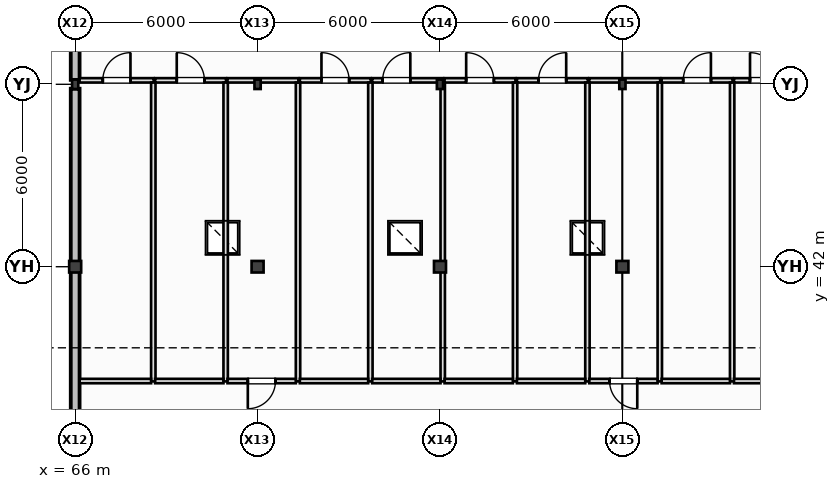
"""IFC4 building model, lengths in metres.
Left out: names, types, materials, properties, quantities, classifications, styles, units other than length and angle.
Written with IfcOpenShell. Run it as: python <this file> out.ifc"""

import sys

from ifc_helpers import new_model, si_unit, direction, frame, frame_2d, origin, origin_2d, place, context, subcontext, project, spatial, rectangle, i_section, extrude, element, fill, save


model = new_model("IFC4")
c1 = context("Model", 3, precision=1e-05, world=origin(), true_north=direction((0.0, 1.0)))
c2 = subcontext(c1, "Body", "Model", "MODEL_VIEW")
j1 = project(units=[si_unit("LENGTHUNIT", "METRE"), si_unit("PLANEANGLEUNIT", "RADIAN")], contexts=[c1])
p1 = place(None, origin())
s1 = spatial("IfcSite", under=j1, at=p1, CompositionType="ELEMENT")
p2 = place(p1, origin())
s2 = spatial("IfcBuilding", under=s1, at=p2, CompositionType="ELEMENT")
p3 = place(p2, frame((0.0, 0.0, 10.0)))
s3 = spatial("IfcBuildingStorey", under=s2, at=p3, CompositionType="ELEMENT", Elevation=10.0)
p4 = place(p3, frame((66.0, 42.0, 0.0), z_axis=(0.0, 0.0, 1.0), x_axis=(1.0, 0.0, 0.0)))
e1 = element("IfcColumn", 1, at=p4, inside=s3, PredefinedType="COLUMN", context=c2, shape_type="SweptSolid", body=[
    extrude(i_section(OverallWidth=0.395, OverallDepth=0.38, WebThickness=0.019, FlangeThickness=0.03, at=origin_2d()), origin(), (0.0, 0.0, 1.0), 4.0),
])
p5 = place(p3, frame((66.0, 48.0, 0.0), z_axis=(0.0, 0.0, 1.0), x_axis=(1.0, 0.0, 0.0)))
e2 = element("IfcColumn", 2, at=p5, inside=s3, PredefinedType="COLUMN", context=c2, shape_type="SweptSolid", body=[
    extrude(i_section(OverallWidth=0.205, OverallDepth=0.31, WebThickness=0.01, FlangeThickness=0.016, at=origin_2d()), origin(), (0.0, 0.0, 1.0), 4.0),
])
p6 = place(p3, frame((72.0, 42.0, 0.0), z_axis=(0.0, 0.0, 1.0), x_axis=(1.0, 0.0, 0.0)))
e3 = element("IfcColumn", 3, at=p6, inside=s3, PredefinedType="COLUMN", context=c2, shape_type="SweptSolid", body=[
    extrude(i_section(OverallWidth=0.395, OverallDepth=0.38, WebThickness=0.019, FlangeThickness=0.03, at=origin_2d()), origin(), (0.0, 0.0, 1.0), 4.0),
])
p7 = place(p3, frame((72.0, 48.0, 0.0), z_axis=(0.0, 0.0, 1.0), x_axis=(1.0, 0.0, 0.0)))
e4 = element("IfcColumn", 4, at=p7, inside=s3, PredefinedType="COLUMN", context=c2, shape_type="SweptSolid", body=[
    extrude(i_section(OverallWidth=0.205, OverallDepth=0.31, WebThickness=0.01, FlangeThickness=0.016, at=origin_2d()), origin(), (0.0, 0.0, 1.0), 4.0),
])
p8 = place(p3, frame((78.0, 42.0, 0.0), z_axis=(0.0, 0.0, 1.0), x_axis=(1.0, 0.0, 0.0)))
e5 = element("IfcColumn", 5, at=p8, inside=s3, PredefinedType="COLUMN", context=c2, shape_type="SweptSolid", body=[
    extrude(i_section(OverallWidth=0.395, OverallDepth=0.38, WebThickness=0.019, FlangeThickness=0.03, at=origin_2d()), origin(), (0.0, 0.0, 1.0), 4.0),
])
p9 = place(p3, frame((78.0, 48.0, 0.0), z_axis=(0.0, 0.0, 1.0), x_axis=(1.0, 0.0, 0.0)))
e6 = element("IfcColumn", 6, at=p9, inside=s3, PredefinedType="COLUMN", context=c2, shape_type="SweptSolid", body=[
    extrude(i_section(OverallWidth=0.205, OverallDepth=0.31, WebThickness=0.01, FlangeThickness=0.016, at=origin_2d()), origin(), (0.0, 0.0, 1.0), 4.0),
])
p10 = place(p3, frame((84.0, 42.0, 0.0), z_axis=(0.0, 0.0, 1.0), x_axis=(1.0, 0.0, 0.0)))
e7 = element("IfcColumn", 7, at=p10, inside=s3, PredefinedType="COLUMN", context=c2, shape_type="SweptSolid", body=[
    extrude(i_section(OverallWidth=0.395, OverallDepth=0.38, WebThickness=0.019, FlangeThickness=0.03, at=origin_2d()), origin(), (0.0, 0.0, 1.0), 4.0),
])
p11 = place(p3, frame((84.0, 48.0, 0.0), z_axis=(0.0, 0.0, 1.0), x_axis=(1.0, 0.0, 0.0)))
e8 = element("IfcColumn", 8, at=p11, inside=s3, PredefinedType="COLUMN", context=c2, shape_type="SweptSolid", body=[
    extrude(i_section(OverallWidth=0.205, OverallDepth=0.31, WebThickness=0.01, FlangeThickness=0.016, at=origin_2d()), origin(), (0.0, 0.0, 1.0), 4.0),
])
p12 = place(p3, frame((66.0, 41.855, 0.0), z_axis=(0.0, 0.0, 1.0), x_axis=(0.0, -1.0, 0.0)))
e9 = element("IfcWall", 9, at=p12, inside=s3, PredefinedType="STANDARD", context=c2, shape_type="SweptSolid", body=[
    extrude(rectangle(XDim=5.71, YDim=0.29, at=frame_2d((2.855, 0.0))), origin(), (0.0, 0.0, 1.0), 1.37),
])
for number, where, z_axis, x_axis in (
    (10, (66.0, 47.855, 0.0), (0.0, 0.0, 1.0), (0.0, -1.0, 0.0)),
    (11, (66.0, 53.855, 0.0), (0.0, 0.0, 1.0), (0.0, -1.0, 0.0)),
):
    element("IfcWall", number, at=place(p3, frame(where, z_axis=z_axis, x_axis=x_axis)), inside=s3, PredefinedType="STANDARD", context=c2, shape_type="SweptSolid", body=[
        extrude(rectangle(XDim=5.71, YDim=0.29, at=frame_2d((2.855, 0.0))), origin(), (0.0, 0.0, 1.0), 1.391),
    ])
p13 = place(p3, frame((66.145, 48.13, 0.0), z_axis=(0.0, 0.0, 1.0), x_axis=(1.0, 0.0, 0.0)))
e12 = element("IfcWall", 12, at=p13, inside=s3, PredefinedType="PARTITIONING", context=c2, shape_type="SweptSolid", body=[
    extrude(rectangle(XDim=2.438, YDim=0.145, at=frame_2d((1.219, 0.0))), origin(), (0.0, 0.0, 1.0), 3.74),
])
p14 = place(p13, frame((0.764, 0.0, 0.0)))
e13 = element("IfcOpeningElement", 13, at=p14, cuts=e12, PredefinedType="OPENING", context=c2, shape_type="SweptSolid", body=[
    extrude(rectangle(XDim=0.91, YDim=2.1, at=frame_2d((0.455, 1.05))), frame((0.0, 0.083, 0.0), z_axis=(0.0, -1.0, 0.0), x_axis=(1.0, 0.0, 0.0)), (0.0, 0.0, 1.0), 0.165),
])
p15 = place(p3, frame((68.57, 48.058, 0.0), z_axis=(0.0, 0.0, 1.0), x_axis=(0.0, -1.0, 0.0)))
e14 = element("IfcWall", 14, at=p15, inside=s3, PredefinedType="PARTITIONING", context=c2, shape_type="SweptSolid", body=[
    extrude(rectangle(XDim=9.83, YDim=0.145, at=frame_2d((4.915, 0.0))), origin(), (0.0, 0.0, 1.0), 3.74),
])
p16 = place(p3, frame((68.498, 38.24, 0.0), z_axis=(0.0, 0.0, 1.0), x_axis=(-1.0, 0.0, 0.0)))
e15 = element("IfcWall", 15, at=p16, inside=s3, PredefinedType="PARTITIONING", context=c2, shape_type="SweptSolid", body=[
    extrude(rectangle(XDim=2.353, YDim=0.145, at=frame_2d((1.176, 0.0))), origin(), (0.0, 0.0, 1.0), 3.74),
])
p17 = place(p3, frame((68.63, 48.13, 0.0), z_axis=(0.0, 0.0, 1.0), x_axis=(1.0, 0.0, 0.0)))
e16 = element("IfcWall", 16, at=p17, inside=s3, PredefinedType="PARTITIONING", context=c2, shape_type="SweptSolid", body=[
    extrude(rectangle(XDim=2.333, YDim=0.145, at=frame_2d((1.166, 0.0))), origin(), (0.0, 0.0, 1.0), 3.74),
])
p18 = place(p17, frame((0.711, 0.0, 0.0)))
e17 = element("IfcOpeningElement", 17, at=p18, cuts=e16, PredefinedType="OPENING", context=c2, shape_type="SweptSolid", body=[
    extrude(rectangle(XDim=0.91, YDim=2.1, at=frame_2d((0.455, 1.05))), frame((0.0, 0.083, 0.0), z_axis=(0.0, -1.0, 0.0), x_axis=(1.0, 0.0, 0.0)), (0.0, 0.0, 1.0), 0.165),
])
p19 = place(p3, frame((70.95, 48.058, 0.0), z_axis=(0.0, 0.0, 1.0), x_axis=(0.0, -1.0, 0.0)))
e18 = element("IfcWall", 18, at=p19, inside=s3, PredefinedType="PARTITIONING", context=c2, shape_type="SweptSolid", body=[
    extrude(rectangle(XDim=9.83, YDim=0.145, at=frame_2d((4.915, 0.0))), origin(), (0.0, 0.0, 1.0), 3.74),
])
p20 = place(p3, frame((70.877, 38.24, 0.0), z_axis=(0.0, 0.0, 1.0), x_axis=(-1.0, 0.0, 0.0)))
e19 = element("IfcWall", 19, at=p20, inside=s3, PredefinedType="PARTITIONING", context=c2, shape_type="SweptSolid", body=[
    extrude(rectangle(XDim=2.248, YDim=0.145, at=frame_2d((1.124, 0.0))), origin(), (0.0, 0.0, 1.0), 3.74),
])
p21 = place(p3, frame((71.01, 48.13, 0.0), z_axis=(0.0, 0.0, 1.0), x_axis=(1.0, 0.0, 0.0)))
e20 = element("IfcWall", 20, at=p21, inside=s3, PredefinedType="PARTITIONING", context=c2, shape_type="SweptSolid", body=[
    extrude(rectangle(XDim=2.333, YDim=0.145, at=frame_2d((1.166, 0.0))), origin(), (0.0, 0.0, 1.0), 3.74),
])
p22 = place(p3, frame((73.33, 48.058, 0.0), z_axis=(0.0, 0.0, 1.0), x_axis=(0.0, -1.0, 0.0)))
e21 = element("IfcWall", 21, at=p22, inside=s3, PredefinedType="PARTITIONING", context=c2, shape_type="SweptSolid", body=[
    extrude(rectangle(XDim=9.83, YDim=0.145, at=frame_2d((4.915, 0.0))), origin(), (0.0, 0.0, 1.0), 3.74),
])
p23 = place(p3, frame((73.258, 38.24, 0.0), z_axis=(0.0, 0.0, 1.0), x_axis=(-1.0, 0.0, 0.0)))
e22 = element("IfcWall", 22, at=p23, inside=s3, PredefinedType="PARTITIONING", context=c2, shape_type="SweptSolid", body=[
    extrude(rectangle(XDim=2.248, YDim=0.145, at=frame_2d((1.124, 0.0))), origin(), (0.0, 0.0, 1.0), 3.74),
])
p24 = place(p23, frame((0.669, 0.0, 0.0)))
e23 = element("IfcOpeningElement", 23, at=p24, cuts=e22, PredefinedType="OPENING", context=c2, shape_type="SweptSolid", body=[
    extrude(rectangle(XDim=0.91, YDim=2.1, at=frame_2d((0.455, 1.05))), frame((0.0, 0.083, 0.0), z_axis=(0.0, -1.0, 0.0), x_axis=(1.0, 0.0, 0.0)), (0.0, 0.0, 1.0), 0.165),
])
p25 = place(p3, frame((73.39, 48.13, 0.0), z_axis=(0.0, 0.0, 1.0), x_axis=(1.0, 0.0, 0.0)))
e24 = element("IfcWall", 24, at=p25, inside=s3, PredefinedType="PARTITIONING", context=c2, shape_type="SweptSolid", body=[
    extrude(rectangle(XDim=2.333, YDim=0.145, at=frame_2d((1.166, 0.0))), origin(), (0.0, 0.0, 1.0), 3.74),
])
p26 = place(p25, frame((0.711, 0.0, 0.0)))
e25 = element("IfcOpeningElement", 25, at=p26, cuts=e24, PredefinedType="OPENING", context=c2, shape_type="SweptSolid", body=[
    extrude(rectangle(XDim=0.91, YDim=2.1, at=frame_2d((0.455, 1.05))), frame((0.0, 0.083, 0.0), z_axis=(0.0, -1.0, 0.0), x_axis=(1.0, 0.0, 0.0)), (0.0, 0.0, 1.0), 0.165),
])
p27 = place(p3, frame((75.71, 48.058, 0.0), z_axis=(0.0, 0.0, 1.0), x_axis=(0.0, -1.0, 0.0)))
e26 = element("IfcWall", 26, at=p27, inside=s3, PredefinedType="PARTITIONING", context=c2, shape_type="SweptSolid", body=[
    extrude(rectangle(XDim=9.83, YDim=0.145, at=frame_2d((4.915, 0.0))), origin(), (0.0, 0.0, 1.0), 3.74),
])
p28 = place(p3, frame((75.637, 38.24, 0.0), z_axis=(0.0, 0.0, 1.0), x_axis=(-1.0, 0.0, 0.0)))
e27 = element("IfcWall", 27, at=p28, inside=s3, PredefinedType="PARTITIONING", context=c2, shape_type="SweptSolid", body=[
    extrude(rectangle(XDim=2.248, YDim=0.145, at=frame_2d((1.124, 0.0))), origin(), (0.0, 0.0, 1.0), 3.74),
])
p29 = place(p3, frame((75.77, 48.13, 0.0), z_axis=(0.0, 0.0, 1.0), x_axis=(1.0, 0.0, 0.0)))
e28 = element("IfcWall", 28, at=p29, inside=s3, PredefinedType="PARTITIONING", context=c2, shape_type="SweptSolid", body=[
    extrude(rectangle(XDim=2.333, YDim=0.145, at=frame_2d((1.166, 0.0))), origin(), (0.0, 0.0, 1.0), 3.74),
])
p30 = place(p29, frame((0.344, 0.0, 0.0)))
e29 = element("IfcOpeningElement", 29, at=p30, cuts=e28, PredefinedType="OPENING", context=c2, shape_type="SweptSolid", body=[
    extrude(rectangle(XDim=0.91, YDim=2.1, at=frame_2d((0.455, 1.05))), frame((0.0, 0.083, 0.0), z_axis=(0.0, -1.0, 0.0), x_axis=(1.0, 0.0, 0.0)), (0.0, 0.0, 1.0), 0.165),
])
p31 = place(p3, frame((78.09, 48.058, 0.0), z_axis=(0.0, 0.0, 1.0), x_axis=(0.0, -1.0, 0.0)))
e30 = element("IfcWall", 30, at=p31, inside=s3, PredefinedType="PARTITIONING", context=c2, shape_type="SweptSolid", body=[
    extrude(rectangle(XDim=9.83, YDim=0.145, at=frame_2d((4.915, 0.0))), origin(), (0.0, 0.0, 1.0), 3.74),
])
p32 = place(p3, frame((78.018, 38.24, 0.0), z_axis=(0.0, 0.0, 1.0), x_axis=(-1.0, 0.0, 0.0)))
e31 = element("IfcWall", 31, at=p32, inside=s3, PredefinedType="PARTITIONING", context=c2, shape_type="SweptSolid", body=[
    extrude(rectangle(XDim=2.248, YDim=0.145, at=frame_2d((1.124, 0.0))), origin(), (0.0, 0.0, 1.0), 3.74),
])
p33 = place(p3, frame((78.15, 48.13, 0.0), z_axis=(0.0, 0.0, 1.0), x_axis=(1.0, 0.0, 0.0)))
e32 = element("IfcWall", 32, at=p33, inside=s3, PredefinedType="PARTITIONING", context=c2, shape_type="SweptSolid", body=[
    extrude(rectangle(XDim=2.333, YDim=0.145, at=frame_2d((1.166, 0.0))), origin(), (0.0, 0.0, 1.0), 3.74),
])
p34 = place(p33, frame((0.711, 0.0, 0.0)))
e33 = element("IfcOpeningElement", 33, at=p34, cuts=e32, PredefinedType="OPENING", context=c2, shape_type="SweptSolid", body=[
    extrude(rectangle(XDim=0.91, YDim=2.1, at=frame_2d((0.455, 1.05))), frame((0.0, 0.083, 0.0), z_axis=(0.0, -1.0, 0.0), x_axis=(1.0, 0.0, 0.0)), (0.0, 0.0, 1.0), 0.165),
])
p35 = place(p3, frame((80.47, 48.058, 0.0), z_axis=(0.0, 0.0, 1.0), x_axis=(0.0, -1.0, 0.0)))
e34 = element("IfcWall", 34, at=p35, inside=s3, PredefinedType="PARTITIONING", context=c2, shape_type="SweptSolid", body=[
    extrude(rectangle(XDim=9.83, YDim=0.145, at=frame_2d((4.915, 0.0))), origin(), (0.0, 0.0, 1.0), 3.74),
])
p36 = place(p3, frame((80.397, 38.24, 0.0), z_axis=(0.0, 0.0, 1.0), x_axis=(-1.0, 0.0, 0.0)))
e35 = element("IfcWall", 35, at=p36, inside=s3, PredefinedType="PARTITIONING", context=c2, shape_type="SweptSolid", body=[
    extrude(rectangle(XDim=2.248, YDim=0.145, at=frame_2d((1.124, 0.0))), origin(), (0.0, 0.0, 1.0), 3.74),
])
p37 = place(p3, frame((80.53, 48.13, 0.0), z_axis=(0.0, 0.0, 1.0), x_axis=(1.0, 0.0, 0.0)))
e36 = element("IfcWall", 36, at=p37, inside=s3, PredefinedType="PARTITIONING", context=c2, shape_type="SweptSolid", body=[
    extrude(rectangle(XDim=2.333, YDim=0.145, at=frame_2d((1.166, 0.0))), origin(), (0.0, 0.0, 1.0), 3.74),
])
p38 = place(p37, frame((0.711, 0.0, 0.0)))
e37 = element("IfcOpeningElement", 37, at=p38, cuts=e36, PredefinedType="OPENING", context=c2, shape_type="SweptSolid", body=[
    extrude(rectangle(XDim=0.91, YDim=2.1, at=frame_2d((0.455, 1.05))), frame((0.0, 0.083, 0.0), z_axis=(0.0, -1.0, 0.0), x_axis=(1.0, 0.0, 0.0)), (0.0, 0.0, 1.0), 0.165),
])
p39 = place(p3, frame((82.85, 48.058, 0.0), z_axis=(0.0, 0.0, 1.0), x_axis=(0.0, -1.0, 0.0)))
e38 = element("IfcWall", 38, at=p39, inside=s3, PredefinedType="PARTITIONING", context=c2, shape_type="SweptSolid", body=[
    extrude(rectangle(XDim=9.83, YDim=0.145, at=frame_2d((4.915, 0.0))), origin(), (0.0, 0.0, 1.0), 3.74),
])
p40 = place(p3, frame((82.778, 38.24, 0.0), z_axis=(0.0, 0.0, 1.0), x_axis=(-1.0, 0.0, 0.0)))
e39 = element("IfcWall", 39, at=p40, inside=s3, PredefinedType="PARTITIONING", context=c2, shape_type="SweptSolid", body=[
    extrude(rectangle(XDim=2.248, YDim=0.145, at=frame_2d((1.124, 0.0))), origin(), (0.0, 0.0, 1.0), 3.74),
])
p41 = place(p3, frame((82.91, 48.13, 0.0), z_axis=(0.0, 0.0, 1.0), x_axis=(1.0, 0.0, 0.0)))
e40 = element("IfcWall", 40, at=p41, inside=s3, PredefinedType="PARTITIONING", context=c2, shape_type="SweptSolid", body=[
    extrude(rectangle(XDim=2.333, YDim=0.145, at=frame_2d((1.166, 0.0))), origin(), (0.0, 0.0, 1.0), 3.74),
])
p42 = place(p3, frame((85.23, 48.058, 0.0), z_axis=(0.0, 0.0, 1.0), x_axis=(0.0, -1.0, 0.0)))
e41 = element("IfcWall", 41, at=p42, inside=s3, PredefinedType="PARTITIONING", context=c2, shape_type="SweptSolid", body=[
    extrude(rectangle(XDim=9.83, YDim=0.145, at=frame_2d((4.915, 0.0))), origin(), (0.0, 0.0, 1.0), 3.74),
])
p43 = place(p3, frame((85.157, 38.24, 0.0), z_axis=(0.0, 0.0, 1.0), x_axis=(-1.0, 0.0, 0.0)))
e42 = element("IfcWall", 42, at=p43, inside=s3, PredefinedType="PARTITIONING", context=c2, shape_type="SweptSolid", body=[
    extrude(rectangle(XDim=2.248, YDim=0.145, at=frame_2d((1.124, 0.0))), origin(), (0.0, 0.0, 1.0), 3.74),
])
p44 = place(p43, frame((0.669, 0.0, 0.0)))
e43 = element("IfcOpeningElement", 43, at=p44, cuts=e42, PredefinedType="OPENING", context=c2, shape_type="SweptSolid", body=[
    extrude(rectangle(XDim=0.91, YDim=2.1, at=frame_2d((0.455, 1.05))), frame((0.0, 0.083, 0.0), z_axis=(0.0, -1.0, 0.0), x_axis=(1.0, 0.0, 0.0)), (0.0, 0.0, 1.0), 0.165),
])
p45 = place(p3, frame((85.29, 48.13, 0.0), z_axis=(0.0, 0.0, 1.0), x_axis=(1.0, 0.0, 0.0)))
e44 = element("IfcWall", 44, at=p45, inside=s3, PredefinedType="PARTITIONING", context=c2, shape_type="SweptSolid", body=[
    extrude(rectangle(XDim=2.333, YDim=0.145, at=frame_2d((1.166, 0.0))), origin(), (0.0, 0.0, 1.0), 3.74),
])
p46 = place(p45, frame((0.711, 0.0, 0.0)))
e45 = element("IfcOpeningElement", 45, at=p46, cuts=e44, PredefinedType="OPENING", context=c2, shape_type="SweptSolid", body=[
    extrude(rectangle(XDim=0.91, YDim=2.1, at=frame_2d((0.455, 1.05))), frame((0.0, 0.083, 0.0), z_axis=(0.0, -1.0, 0.0), x_axis=(1.0, 0.0, 0.0)), (0.0, 0.0, 1.0), 0.165),
])
p47 = place(p3, frame((87.61, 48.058, 0.0), z_axis=(0.0, 0.0, 1.0), x_axis=(0.0, -1.0, 0.0)))
e46 = element("IfcWall", 46, at=p47, inside=s3, PredefinedType="PARTITIONING", context=c2, shape_type="SweptSolid", body=[
    extrude(rectangle(XDim=9.83, YDim=0.145, at=frame_2d((4.915, 0.0))), origin(), (0.0, 0.0, 1.0), 3.74),
])
p48 = place(p3, frame((87.538, 38.24, 0.0), z_axis=(0.0, 0.0, 1.0), x_axis=(-1.0, 0.0, 0.0)))
e47 = element("IfcWall", 47, at=p48, inside=s3, PredefinedType="PARTITIONING", context=c2, shape_type="SweptSolid", body=[
    extrude(rectangle(XDim=2.248, YDim=0.145, at=frame_2d((1.124, 0.0))), origin(), (0.0, 0.0, 1.0), 3.74),
])
p49 = place(p3, frame((87.67, 48.13, 0.0), z_axis=(0.0, 0.0, 1.0), x_axis=(1.0, 0.0, 0.0)))
e48 = element("IfcWall", 48, at=p49, inside=s3, PredefinedType="PARTITIONING", context=c2, shape_type="SweptSolid", body=[
    extrude(rectangle(XDim=2.333, YDim=0.145, at=frame_2d((1.166, 0.0))), origin(), (0.0, 0.0, 1.0), 3.74),
])
p50 = place(p49, frame((0.528, 0.0, 0.0)))
e49 = element("IfcOpeningElement", 49, at=p50, cuts=e48, PredefinedType="OPENING", context=c2, shape_type="SweptSolid", body=[
    extrude(rectangle(XDim=0.91, YDim=2.1, at=frame_2d((0.455, 1.05))), frame((0.0, 0.083, 0.0), z_axis=(0.0, -1.0, 0.0), x_axis=(1.0, 0.0, 0.0)), (0.0, 0.0, 1.0), 0.165),
])
p51 = place(p3, frame((89.917, 38.24, 0.0), z_axis=(0.0, 0.0, 1.0), x_axis=(-1.0, 0.0, 0.0)))
e50 = element("IfcWall", 50, at=p51, inside=s3, PredefinedType="PARTITIONING", context=c2, shape_type="SweptSolid", body=[
    extrude(rectangle(XDim=2.248, YDim=0.145, at=frame_2d((1.124, 0.0))), origin(), (0.0, 0.0, 1.0), 3.74),
])
p52 = place(p14, frame((0.91, 0.0, 0.0), z_axis=(0.0, 0.0, 1.0), x_axis=(-1.0, 0.0, 0.0)))
e51 = element("IfcDoor", 51, at=p52, inside=s3, OperationType="SINGLE_SWING_RIGHT", PredefinedType="DOOR", context=c2, shape_type="SweptSolid", body=[
    extrude(rectangle(XDim=0.91, YDim=2.1, at=frame_2d((0.455, 1.05))), frame((0.0, 0.025, 0.0), z_axis=(0.0, -1.0, 0.0), x_axis=(1.0, 0.0, 0.0)), (0.0, 0.0, 1.0), 0.05),
])
fill(e13, e51)
p53 = place(p18, frame((0.91, 0.0, 0.0), z_axis=(0.0, 0.0, 1.0), x_axis=(-1.0, 0.0, 0.0)))
e52 = element("IfcDoor", 52, at=p53, inside=s3, OperationType="SINGLE_SWING_LEFT", PredefinedType="DOOR", context=c2, shape_type="SweptSolid", body=[
    extrude(rectangle(XDim=0.91, YDim=2.1, at=frame_2d((0.455, 1.05))), frame((0.0, 0.025, 0.0), z_axis=(0.0, -1.0, 0.0), x_axis=(1.0, 0.0, 0.0)), (0.0, 0.0, 1.0), 0.05),
])
fill(e17, e52)
p54 = place(p24, frame((0.91, 0.0, 0.0), z_axis=(0.0, 0.0, 1.0), x_axis=(-1.0, 0.0, 0.0)))
e53 = element("IfcDoor", 53, at=p54, inside=s3, OperationType="SINGLE_SWING_RIGHT", PredefinedType="DOOR", context=c2, shape_type="SweptSolid", body=[
    extrude(rectangle(XDim=0.91, YDim=2.1, at=frame_2d((0.455, 1.05))), frame((0.0, 0.025, 0.0), z_axis=(0.0, -1.0, 0.0), x_axis=(1.0, 0.0, 0.0)), (0.0, 0.0, 1.0), 0.05),
])
fill(e23, e53)
p55 = place(p26, frame((0.91, 0.0, 0.0), z_axis=(0.0, 0.0, 1.0), x_axis=(-1.0, 0.0, 0.0)))
e54 = element("IfcDoor", 54, at=p55, inside=s3, OperationType="SINGLE_SWING_LEFT", PredefinedType="DOOR", context=c2, shape_type="SweptSolid", body=[
    extrude(rectangle(XDim=0.91, YDim=2.1, at=frame_2d((0.455, 1.05))), frame((0.0, 0.025, 0.0), z_axis=(0.0, -1.0, 0.0), x_axis=(1.0, 0.0, 0.0)), (0.0, 0.0, 1.0), 0.05),
])
fill(e25, e54)
p56 = place(p30, frame((0.91, 0.0, 0.0), z_axis=(0.0, 0.0, 1.0), x_axis=(-1.0, 0.0, 0.0)))
e55 = element("IfcDoor", 55, at=p56, inside=s3, OperationType="SINGLE_SWING_RIGHT", PredefinedType="DOOR", context=c2, shape_type="SweptSolid", body=[
    extrude(rectangle(XDim=0.91, YDim=2.1, at=frame_2d((0.455, 1.05))), frame((0.0, 0.025, 0.0), z_axis=(0.0, -1.0, 0.0), x_axis=(1.0, 0.0, 0.0)), (0.0, 0.0, 1.0), 0.05),
])
fill(e29, e55)
p57 = place(p34, frame((0.91, 0.0, 0.0), z_axis=(0.0, 0.0, 1.0), x_axis=(-1.0, 0.0, 0.0)))
e56 = element("IfcDoor", 56, at=p57, inside=s3, OperationType="SINGLE_SWING_LEFT", PredefinedType="DOOR", context=c2, shape_type="SweptSolid", body=[
    extrude(rectangle(XDim=0.91, YDim=2.1, at=frame_2d((0.455, 1.05))), frame((0.0, 0.025, 0.0), z_axis=(0.0, -1.0, 0.0), x_axis=(1.0, 0.0, 0.0)), (0.0, 0.0, 1.0), 0.05),
])
fill(e33, e56)
p58 = place(p38, frame((0.91, 0.0, 0.0), z_axis=(0.0, 0.0, 1.0), x_axis=(-1.0, 0.0, 0.0)))
e57 = element("IfcDoor", 57, at=p58, inside=s3, OperationType="SINGLE_SWING_RIGHT", PredefinedType="DOOR", context=c2, shape_type="SweptSolid", body=[
    extrude(rectangle(XDim=0.91, YDim=2.1, at=frame_2d((0.455, 1.05))), frame((0.0, 0.025, 0.0), z_axis=(0.0, -1.0, 0.0), x_axis=(1.0, 0.0, 0.0)), (0.0, 0.0, 1.0), 0.05),
])
fill(e37, e57)
p59 = place(p44, frame((0.91, 0.0, 0.0), z_axis=(0.0, 0.0, 1.0), x_axis=(-1.0, 0.0, 0.0)))
e58 = element("IfcDoor", 58, at=p59, inside=s3, OperationType="SINGLE_SWING_LEFT", PredefinedType="DOOR", context=c2, shape_type="SweptSolid", body=[
    extrude(rectangle(XDim=0.91, YDim=2.1, at=frame_2d((0.455, 1.05))), frame((0.0, 0.025, 0.0), z_axis=(0.0, -1.0, 0.0), x_axis=(1.0, 0.0, 0.0)), (0.0, 0.0, 1.0), 0.05),
])
fill(e43, e58)
p60 = place(p46, frame((0.91, 0.0, 0.0), z_axis=(0.0, 0.0, 1.0), x_axis=(-1.0, 0.0, 0.0)))
e59 = element("IfcDoor", 59, at=p60, inside=s3, OperationType="SINGLE_SWING_RIGHT", PredefinedType="DOOR", context=c2, shape_type="SweptSolid", body=[
    extrude(rectangle(XDim=0.91, YDim=2.1, at=frame_2d((0.455, 1.05))), frame((0.0, 0.025, 0.0), z_axis=(0.0, -1.0, 0.0), x_axis=(1.0, 0.0, 0.0)), (0.0, 0.0, 1.0), 0.05),
])
fill(e45, e59)
p61 = place(p50, frame((0.91, 0.0, 0.0), z_axis=(0.0, 0.0, 1.0), x_axis=(-1.0, 0.0, 0.0)))
e60 = element("IfcDoor", 60, at=p61, inside=s3, OperationType="SINGLE_SWING_LEFT", PredefinedType="DOOR", context=c2, shape_type="SweptSolid", body=[
    extrude(rectangle(XDim=0.91, YDim=2.1, at=frame_2d((0.455, 1.05))), frame((0.0, 0.025, 0.0), z_axis=(0.0, -1.0, 0.0), x_axis=(1.0, 0.0, 0.0)), (0.0, 0.0, 1.0), 0.05),
])
fill(e49, e60)
save(model, sys.argv[1])
